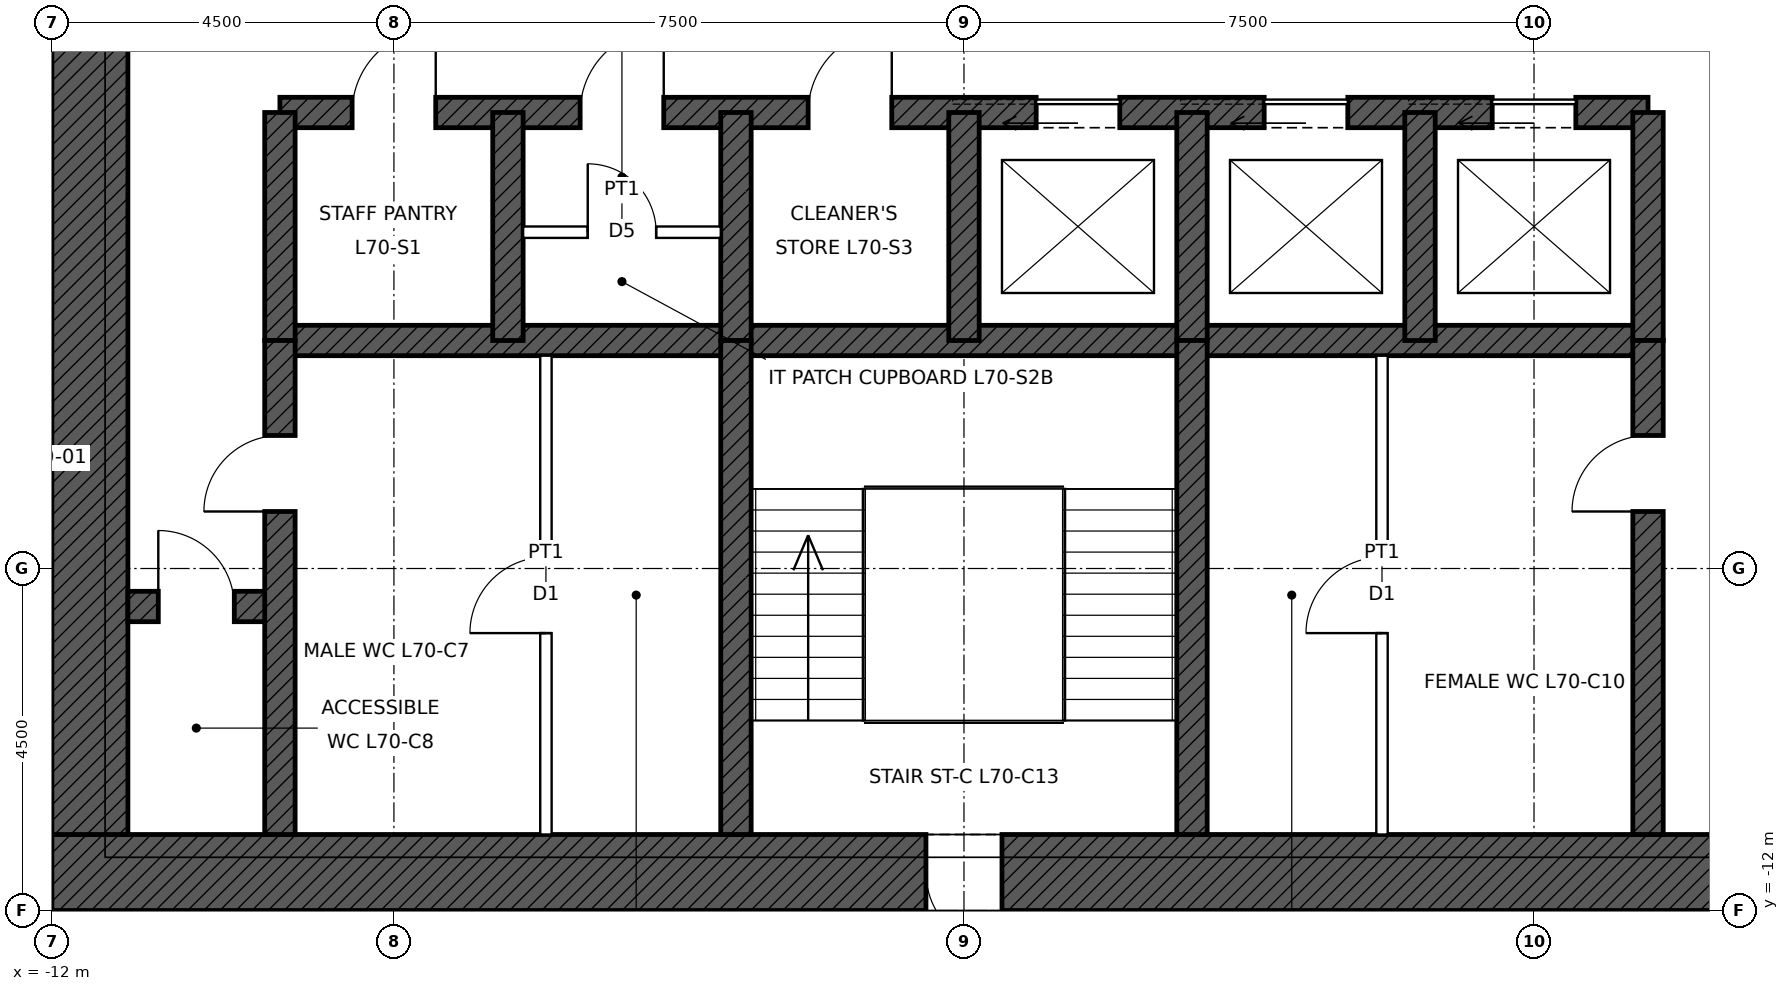
"""IFC4 building model, lengths in metres.
Left out: names, types, materials, properties, quantities, classifications, styles, units other than length and angle.
Written with IfcOpenShell. Run it as: python <this file> out.ifc"""

import sys

from ifc_helpers import new_model, si_unit, direction, frame, frame_2d, origin, place, context, subcontext, project, spatial, rectangle, extrude, element, fill, save


model = new_model("IFC4")
c1 = context("Model", 3, precision=1e-05, world=origin(), true_north=direction((0.0, 1.0)))
c2 = subcontext(c1, "Body", "Model", "MODEL_VIEW")
j1 = project(units=[si_unit("LENGTHUNIT", "METRE"), si_unit("PLANEANGLEUNIT", "RADIAN")], contexts=[c1])
p1 = place(None, origin())
s1 = spatial("IfcSite", under=j1, at=p1, CompositionType="ELEMENT")
p2 = place(p1, origin())
s2 = spatial("IfcBuilding", under=s1, at=p2, CompositionType="ELEMENT")
p3 = place(p2, frame((0.0, 0.0, 315.9)))
s3 = spatial("IfcBuildingStorey", under=s2, at=p3, CompositionType="ELEMENT", Elevation=315.9)
p4 = place(p3, frame((12.0, -11.5, 0.0), z_axis=(0.0, 0.0, 1.0), x_axis=(-1.0, 0.0, 0.0)))
e1 = element("IfcWall", 1, at=p4, inside=s3, PredefinedType="SHEAR", context=c2, shape_type="SweptSolid", body=[
    extrude(rectangle(XDim=24.0, YDim=1.0, at=frame_2d((12.0, 0.0))), origin(), (0.0, 0.0, 1.0), 4.0),
])
p5 = place(p4, frame((11.5, 0.0, 0.0)))
e2 = element("IfcOpeningElement", 2, at=p5, cuts=e1, PredefinedType="OPENING", context=c2, shape_type="SweptSolid", body=[
    extrude(rectangle(XDim=1.0, YDim=2.1, at=frame_2d((0.5, 1.05))), frame((0.0, 0.51, 0.0), z_axis=(0.0, -1.0, 0.0), x_axis=(1.0, 0.0, 0.0)), (0.0, 0.0, 1.0), 1.02),
])
p6 = place(p4, frame((1.0, 0.0, 0.0)))
e3 = element("IfcOpeningElement", 3, at=p6, cuts=e1, PredefinedType="OPENING", context=c2, shape_type="SweptSolid", body=[
    extrude(rectangle(XDim=1.0, YDim=2.4, at=frame_2d((0.5, 1.2))), frame((0.0, 0.51, 0.0), z_axis=(0.0, -1.0, 0.0), x_axis=(1.0, 0.0, 0.0)), (0.0, 0.0, 1.0), 1.02),
])
p7 = place(p3, frame((-11.5, -11.0, 0.0), z_axis=(0.0, 0.0, 1.0), x_axis=(0.0, 1.0, 0.0)))
e4 = element("IfcWall", 4, at=p7, inside=s3, PredefinedType="SHEAR", context=c2, shape_type="SweptSolid", body=[
    extrude(rectangle(XDim=22.0, YDim=1.0, at=frame_2d((11.0, 0.0))), origin(), (0.0, 0.0, 1.0), 4.0),
])
p8 = place(p7, frame((10.5, 0.0, 0.0)))
e5 = element("IfcOpeningElement", 5, at=p8, cuts=e4, PredefinedType="OPENING", context=c2, shape_type="SweptSolid", body=[
    extrude(rectangle(XDim=1.0, YDim=2.4, at=frame_2d((0.5, 1.2))), frame((0.0, 0.51, 0.0), z_axis=(0.0, -1.0, 0.0), x_axis=(1.0, 0.0, 0.0)), (0.0, 0.0, 1.0), 1.02),
])
p9 = place(p3, frame((-9.0, -1.5, 0.0), z_axis=(0.0, 0.0, 1.0), x_axis=(1.0, 0.0, 0.0)))
e6 = element("IfcWall", 6, at=p9, inside=s3, PredefinedType="SHEAR", context=c2, shape_type="SweptSolid", body=[
    extrude(rectangle(XDim=18.0, YDim=0.4, at=frame_2d((9.0, 0.0))), origin(), (0.0, 0.0, 1.0), 4.0),
])
p10 = place(p9, frame((9.95, 0.0, 0.0)))
e7 = element("IfcOpeningElement", 7, at=p10, cuts=e6, PredefinedType="OPENING", context=c2, shape_type="SweptSolid", body=[
    extrude(rectangle(XDim=1.1, YDim=2.1, at=frame_2d((0.55, 1.05))), frame((0.0, 0.21, 0.0), z_axis=(0.0, -1.0, 0.0), x_axis=(1.0, 0.0, 0.0)), (0.0, 0.0, 1.0), 0.42),
])
p11 = place(p9, frame((12.95, 0.0, 0.0)))
e8 = element("IfcOpeningElement", 8, at=p11, cuts=e6, PredefinedType="OPENING", context=c2, shape_type="SweptSolid", body=[
    extrude(rectangle(XDim=1.1, YDim=2.1, at=frame_2d((0.55, 1.05))), frame((0.0, 0.21, 0.0), z_axis=(0.0, -1.0, 0.0), x_axis=(1.0, 0.0, 0.0)), (0.0, 0.0, 1.0), 0.42),
])
p12 = place(p9, frame((15.95, 0.0, 0.0)))
e9 = element("IfcOpeningElement", 9, at=p12, cuts=e6, PredefinedType="OPENING", context=c2, shape_type="SweptSolid", body=[
    extrude(rectangle(XDim=1.1, YDim=2.1, at=frame_2d((0.55, 1.05))), frame((0.0, 0.21, 0.0), z_axis=(0.0, -1.0, 0.0), x_axis=(1.0, 0.0, 0.0)), (0.0, 0.0, 1.0), 0.42),
])
p13 = place(p9, frame((0.95, 0.0, 0.0)))
e10 = element("IfcOpeningElement", 10, at=p13, cuts=e6, PredefinedType="OPENING", context=c2, shape_type="SweptSolid", body=[
    extrude(rectangle(XDim=1.1, YDim=2.1, at=frame_2d((0.55, 1.05))), frame((0.0, 0.21, 0.0), z_axis=(0.0, -1.0, 0.0), x_axis=(1.0, 0.0, 0.0)), (0.0, 0.0, 1.0), 0.42),
])
p14 = place(p9, frame((3.95, 0.0, 0.0)))
e11 = element("IfcOpeningElement", 11, at=p14, cuts=e6, PredefinedType="OPENING", context=c2, shape_type="SweptSolid", body=[
    extrude(rectangle(XDim=1.1, YDim=2.1, at=frame_2d((0.55, 1.05))), frame((0.0, 0.21, 0.0), z_axis=(0.0, -1.0, 0.0), x_axis=(1.0, 0.0, 0.0)), (0.0, 0.0, 1.0), 0.42),
])
p15 = place(p9, frame((6.95, 0.0, 0.0)))
e12 = element("IfcOpeningElement", 12, at=p15, cuts=e6, PredefinedType="OPENING", context=c2, shape_type="SweptSolid", body=[
    extrude(rectangle(XDim=1.1, YDim=2.1, at=frame_2d((0.55, 1.05))), frame((0.0, 0.21, 0.0), z_axis=(0.0, -1.0, 0.0), x_axis=(1.0, 0.0, 0.0)), (0.0, 0.0, 1.0), 0.42),
])
p16 = place(p3, frame((-9.0, -4.5, 0.0), z_axis=(0.0, 0.0, 1.0), x_axis=(1.0, 0.0, 0.0)))
e13 = element("IfcWall", 13, at=p16, inside=s3, PredefinedType="SHEAR", context=c2, shape_type="SweptSolid", body=[
    extrude(rectangle(XDim=18.0, YDim=0.4, at=frame_2d((9.0, 0.0))), origin(), (0.0, 0.0, 1.0), 4.0),
])
p17 = place(p3, frame((-11.0, -8.0, 0.0), z_axis=(0.0, 0.0, 1.0), x_axis=(1.0, 0.0, 0.0)))
e14 = element("IfcWall", 14, at=p17, inside=s3, PredefinedType="SHEAR", context=c2, shape_type="SweptSolid", body=[
    extrude(rectangle(XDim=2.0, YDim=0.4, at=frame_2d((1.0, 0.0))), origin(), (0.0, 0.0, 1.0), 4.0),
])
p18 = place(p17, frame((0.4, 0.0, 0.0)))
e15 = element("IfcOpeningElement", 15, at=p18, cuts=e14, PredefinedType="OPENING", context=c2, shape_type="SweptSolid", body=[
    extrude(rectangle(XDim=1.0, YDim=2.1, at=frame_2d((0.5, 1.05))), frame((0.0, 0.21, 0.0), z_axis=(0.0, -1.0, 0.0), x_axis=(1.0, 0.0, 0.0)), (0.0, 0.0, 1.0), 0.42),
])
for number, where, z_axis, x_axis in (
    (16, (-9.0, -4.5, 0.0), (0.0, 0.0, 1.0), (0.0, 1.0, 0.0)),
    (17, (9.0, -4.5, 0.0), (0.0, 0.0, 1.0), (0.0, 1.0, 0.0)),
    (18, (-6.0, -4.5, 0.0), (0.0, 0.0, 1.0), (0.0, 1.0, 0.0)),
    (19, (-3.0, -4.5, 0.0), (0.0, 0.0, 1.0), (0.0, 1.0, 0.0)),
    (20, (0.0, -4.5, 0.0), (0.0, 0.0, 1.0), (0.0, 1.0, 0.0)),
    (21, (3.0, -4.5, 0.0), (0.0, 0.0, 1.0), (0.0, 1.0, 0.0)),
    (22, (6.0, -4.5, 0.0), (0.0, 0.0, 1.0), (0.0, 1.0, 0.0)),
):
    element("IfcWall", number, at=place(p3, frame(where, z_axis=z_axis, x_axis=x_axis)), inside=s3, PredefinedType="SHEAR", context=c2, shape_type="SweptSolid", body=[
        extrude(rectangle(XDim=3.0, YDim=0.4, at=frame_2d((1.5, 0.0))), origin(), (0.0, 0.0, 1.0), 4.0),
    ])
p19 = place(p3, frame((-9.0, -11.0, 0.0), z_axis=(0.0, 0.0, 1.0), x_axis=(0.0, 1.0, 0.0)))
e23 = element("IfcWall", 23, at=p19, inside=s3, PredefinedType="SHEAR", context=c2, shape_type="SweptSolid", body=[
    extrude(rectangle(XDim=6.5, YDim=0.4, at=frame_2d((3.25, 0.0))), origin(), (0.0, 0.0, 1.0), 4.0),
])
p20 = place(p19, frame((4.25, 0.0, 0.0)))
e24 = element("IfcOpeningElement", 24, at=p20, cuts=e23, PredefinedType="OPENING", context=c2, shape_type="SweptSolid", body=[
    extrude(rectangle(XDim=1.0, YDim=2.1, at=frame_2d((0.5, 1.05))), frame((0.0, 0.21, 0.0), z_axis=(0.0, -1.0, 0.0), x_axis=(1.0, 0.0, 0.0)), (0.0, 0.0, 1.0), 0.42),
])
p21 = place(p3, frame((9.0, -11.0, 0.0), z_axis=(0.0, 0.0, 1.0), x_axis=(0.0, 1.0, 0.0)))
e25 = element("IfcWall", 25, at=p21, inside=s3, PredefinedType="SHEAR", context=c2, shape_type="SweptSolid", body=[
    extrude(rectangle(XDim=6.5, YDim=0.4, at=frame_2d((3.25, 0.0))), origin(), (0.0, 0.0, 1.0), 4.0),
])
p22 = place(p21, frame((4.25, 0.0, 0.0)))
e26 = element("IfcOpeningElement", 26, at=p22, cuts=e25, PredefinedType="OPENING", context=c2, shape_type="SweptSolid", body=[
    extrude(rectangle(XDim=1.0, YDim=2.1, at=frame_2d((0.5, 1.05))), frame((0.0, 0.21, 0.0), z_axis=(0.0, -1.0, 0.0), x_axis=(1.0, 0.0, 0.0)), (0.0, 0.0, 1.0), 0.42),
])
for number, where, z_axis, x_axis in (
    (27, (-3.0, -11.0, 0.0), (0.0, 0.0, 1.0), (0.0, 1.0, 0.0)),
    (28, (3.0, -11.0, 0.0), (0.0, 0.0, 1.0), (0.0, 1.0, 0.0)),
):
    element("IfcWall", number, at=place(p3, frame(where, z_axis=z_axis, x_axis=x_axis)), inside=s3, PredefinedType="SHEAR", context=c2, shape_type="SweptSolid", body=[
        extrude(rectangle(XDim=6.5, YDim=0.4, at=frame_2d((3.25, 0.0))), origin(), (0.0, 0.0, 1.0), 4.0),
    ])
p23 = place(p3, frame((-5.5, -11.0, 0.0), z_axis=(0.0, 0.0, 1.0), x_axis=(0.0, 1.0, 0.0)))
e29 = element("IfcWall", 29, at=p23, inside=s3, PredefinedType="PARTITIONING", context=c2, shape_type="SweptSolid", body=[
    extrude(rectangle(XDim=6.3, YDim=0.15, at=frame_2d((3.15, 0.0))), origin(), (0.0, 0.0, 1.0), 3.75),
])
p24 = place(p23, frame((2.65, 0.0, 0.0)))
e30 = element("IfcOpeningElement", 30, at=p24, cuts=e29, PredefinedType="OPENING", context=c2, shape_type="SweptSolid", body=[
    extrude(rectangle(XDim=1.0, YDim=2.1, at=frame_2d((0.5, 1.05))), frame((0.0, 0.085, 0.0), z_axis=(0.0, -1.0, 0.0), x_axis=(1.0, 0.0, 0.0)), (0.0, 0.0, 1.0), 0.17),
])
p25 = place(p3, frame((5.5, -11.0, 0.0), z_axis=(0.0, 0.0, 1.0), x_axis=(0.0, 1.0, 0.0)))
e31 = element("IfcWall", 31, at=p25, inside=s3, PredefinedType="PARTITIONING", context=c2, shape_type="SweptSolid", body=[
    extrude(rectangle(XDim=6.3, YDim=0.15, at=frame_2d((3.15, 0.0))), origin(), (0.0, 0.0, 1.0), 3.75),
])
p26 = place(p25, frame((2.65, 0.0, 0.0)))
e32 = element("IfcOpeningElement", 32, at=p26, cuts=e31, PredefinedType="OPENING", context=c2, shape_type="SweptSolid", body=[
    extrude(rectangle(XDim=1.0, YDim=2.1, at=frame_2d((0.5, 1.05))), frame((0.0, 0.085, 0.0), z_axis=(0.0, -1.0, 0.0), x_axis=(1.0, 0.0, 0.0)), (0.0, 0.0, 1.0), 0.17),
])
p27 = place(p3, frame((-5.8, -3.075, 0.0), z_axis=(0.0, 0.0, 1.0), x_axis=(1.0, 0.0, 0.0)))
e33 = element("IfcWall", 33, at=p27, inside=s3, PredefinedType="PARTITIONING", context=c2, shape_type="SweptSolid", body=[
    extrude(rectangle(XDim=2.6, YDim=0.15, at=frame_2d((1.3, 0.0))), origin(), (0.0, 0.0, 1.0), 3.75),
])
p28 = place(p27, frame((0.85, 0.0, 0.0)))
e34 = element("IfcOpeningElement", 34, at=p28, cuts=e33, PredefinedType="OPENING", context=c2, shape_type="SweptSolid", body=[
    extrude(rectangle(XDim=0.9, YDim=2.1, at=frame_2d((0.45, 1.05))), frame((0.0, 0.085, 0.0), z_axis=(0.0, -1.0, 0.0), x_axis=(1.0, 0.0, 0.0)), (0.0, 0.0, 1.0), 0.17),
])
p29 = place(p5, origin())
e35 = element("IfcDoor", 35, at=p29, inside=s3, OperationType="SINGLE_SWING_LEFT", PredefinedType="DOOR", context=c2, shape_type="SweptSolid", body=[
    extrude(rectangle(XDim=1.0, YDim=2.1, at=frame_2d((0.5, 1.05))), frame((0.0, 0.485, 0.0), z_axis=(0.0, -1.0, 0.0), x_axis=(1.0, 0.0, 0.0)), (0.0, 0.0, 1.0), 0.05),
])
fill(e2, e35)
p30 = place(p20, origin())
e36 = element("IfcDoor", 36, at=p30, inside=s3, OperationType="SINGLE_SWING_LEFT", PredefinedType="DOOR", context=c2, shape_type="SweptSolid", body=[
    extrude(rectangle(XDim=1.0, YDim=2.1, at=frame_2d((0.5, 1.05))), frame((0.0, 0.025, 0.0), z_axis=(0.0, -1.0, 0.0), x_axis=(1.0, 0.0, 0.0)), (0.0, 0.0, 1.0), 0.05),
])
fill(e24, e36)
p31 = place(p22, origin())
e37 = element("IfcDoor", 37, at=p31, inside=s3, OperationType="SINGLE_SWING_LEFT", PredefinedType="DOOR", context=c2, shape_type="SweptSolid", body=[
    extrude(rectangle(XDim=1.0, YDim=2.1, at=frame_2d((0.5, 1.05))), frame((0.0, 0.025, 0.0), z_axis=(0.0, -1.0, 0.0), x_axis=(1.0, 0.0, 0.0)), (0.0, 0.0, 1.0), 0.05),
])
fill(e26, e37)
p32 = place(p18, origin())
e38 = element("IfcDoor", 38, at=p32, inside=s3, OperationType="SINGLE_SWING_LEFT", PredefinedType="DOOR", context=c2, shape_type="SweptSolid", body=[
    extrude(rectangle(XDim=1.0, YDim=2.1, at=frame_2d((0.5, 1.05))), frame((0.0, 0.025, 0.0), z_axis=(0.0, -1.0, 0.0), x_axis=(1.0, 0.0, 0.0)), (0.0, 0.0, 1.0), 0.05),
])
fill(e15, e38)
p33 = place(p10, origin())
e39 = element("IfcDoor", 39, at=p33, inside=s3, OperationType="SLIDING_TO_LEFT", PredefinedType="DOOR", context=c2, shape_type="SweptSolid", body=[
    extrude(rectangle(XDim=1.1, YDim=2.1, at=frame_2d((0.55, 1.05))), frame((0.0, 0.025, 0.0), z_axis=(0.0, -1.0, 0.0), x_axis=(1.0, 0.0, 0.0)), (0.0, 0.0, 1.0), 0.05),
])
fill(e7, e39)
p34 = place(p11, origin())
e40 = element("IfcDoor", 40, at=p34, inside=s3, OperationType="SLIDING_TO_LEFT", PredefinedType="DOOR", context=c2, shape_type="SweptSolid", body=[
    extrude(rectangle(XDim=1.1, YDim=2.1, at=frame_2d((0.55, 1.05))), frame((0.0, 0.025, 0.0), z_axis=(0.0, -1.0, 0.0), x_axis=(1.0, 0.0, 0.0)), (0.0, 0.0, 1.0), 0.05),
])
fill(e8, e40)
p35 = place(p12, origin())
e41 = element("IfcDoor", 41, at=p35, inside=s3, OperationType="SLIDING_TO_LEFT", PredefinedType="DOOR", context=c2, shape_type="SweptSolid", body=[
    extrude(rectangle(XDim=1.1, YDim=2.1, at=frame_2d((0.55, 1.05))), frame((0.0, 0.025, 0.0), z_axis=(0.0, -1.0, 0.0), x_axis=(1.0, 0.0, 0.0)), (0.0, 0.0, 1.0), 0.05),
])
fill(e9, e41)
p36 = place(p24, origin())
e42 = element("IfcDoor", 42, at=p36, inside=s3, OperationType="SINGLE_SWING_LEFT", PredefinedType="DOOR", context=c2, shape_type="SweptSolid", body=[
    extrude(rectangle(XDim=1.0, YDim=2.1, at=frame_2d((0.5, 1.05))), frame((0.0, 0.025, 0.0), z_axis=(0.0, -1.0, 0.0), x_axis=(1.0, 0.0, 0.0)), (0.0, 0.0, 1.0), 0.05),
])
fill(e30, e42)
p37 = place(p26, origin())
e43 = element("IfcDoor", 43, at=p37, inside=s3, OperationType="SINGLE_SWING_LEFT", PredefinedType="DOOR", context=c2, shape_type="SweptSolid", body=[
    extrude(rectangle(XDim=1.0, YDim=2.1, at=frame_2d((0.5, 1.05))), frame((0.0, 0.025, 0.0), z_axis=(0.0, -1.0, 0.0), x_axis=(1.0, 0.0, 0.0)), (0.0, 0.0, 1.0), 0.05),
])
fill(e32, e43)
p38 = place(p13, origin())
e44 = element("IfcDoor", 44, at=p38, inside=s3, OperationType="SINGLE_SWING_RIGHT", PredefinedType="DOOR", context=c2, shape_type="SweptSolid", body=[
    extrude(rectangle(XDim=1.1, YDim=2.1, at=frame_2d((0.55, 1.05))), frame((0.0, 0.025, 0.0), z_axis=(0.0, -1.0, 0.0), x_axis=(1.0, 0.0, 0.0)), (0.0, 0.0, 1.0), 0.05),
])
fill(e10, e44)
p39 = place(p14, origin())
e45 = element("IfcDoor", 45, at=p39, inside=s3, OperationType="SINGLE_SWING_RIGHT", PredefinedType="DOOR", context=c2, shape_type="SweptSolid", body=[
    extrude(rectangle(XDim=1.1, YDim=2.1, at=frame_2d((0.55, 1.05))), frame((0.0, 0.025, 0.0), z_axis=(0.0, -1.0, 0.0), x_axis=(1.0, 0.0, 0.0)), (0.0, 0.0, 1.0), 0.05),
])
fill(e11, e45)
p40 = place(p28, origin())
e46 = element("IfcDoor", 46, at=p40, inside=s3, OperationType="SINGLE_SWING_LEFT", PredefinedType="DOOR", context=c2, shape_type="SweptSolid", body=[
    extrude(rectangle(XDim=0.9, YDim=2.1, at=frame_2d((0.45, 1.05))), frame((0.0, 0.025, 0.0), z_axis=(0.0, -1.0, 0.0), x_axis=(1.0, 0.0, 0.0)), (0.0, 0.0, 1.0), 0.05),
])
fill(e34, e46)
p41 = place(p15, origin())
e47 = element("IfcDoor", 47, at=p41, inside=s3, OperationType="SINGLE_SWING_RIGHT", PredefinedType="DOOR", context=c2, shape_type="SweptSolid", body=[
    extrude(rectangle(XDim=1.1, YDim=2.1, at=frame_2d((0.55, 1.05))), frame((0.0, 0.025, 0.0), z_axis=(0.0, -1.0, 0.0), x_axis=(1.0, 0.0, 0.0)), (0.0, 0.0, 1.0), 0.05),
])
fill(e12, e47)
save(model, sys.argv[1])
